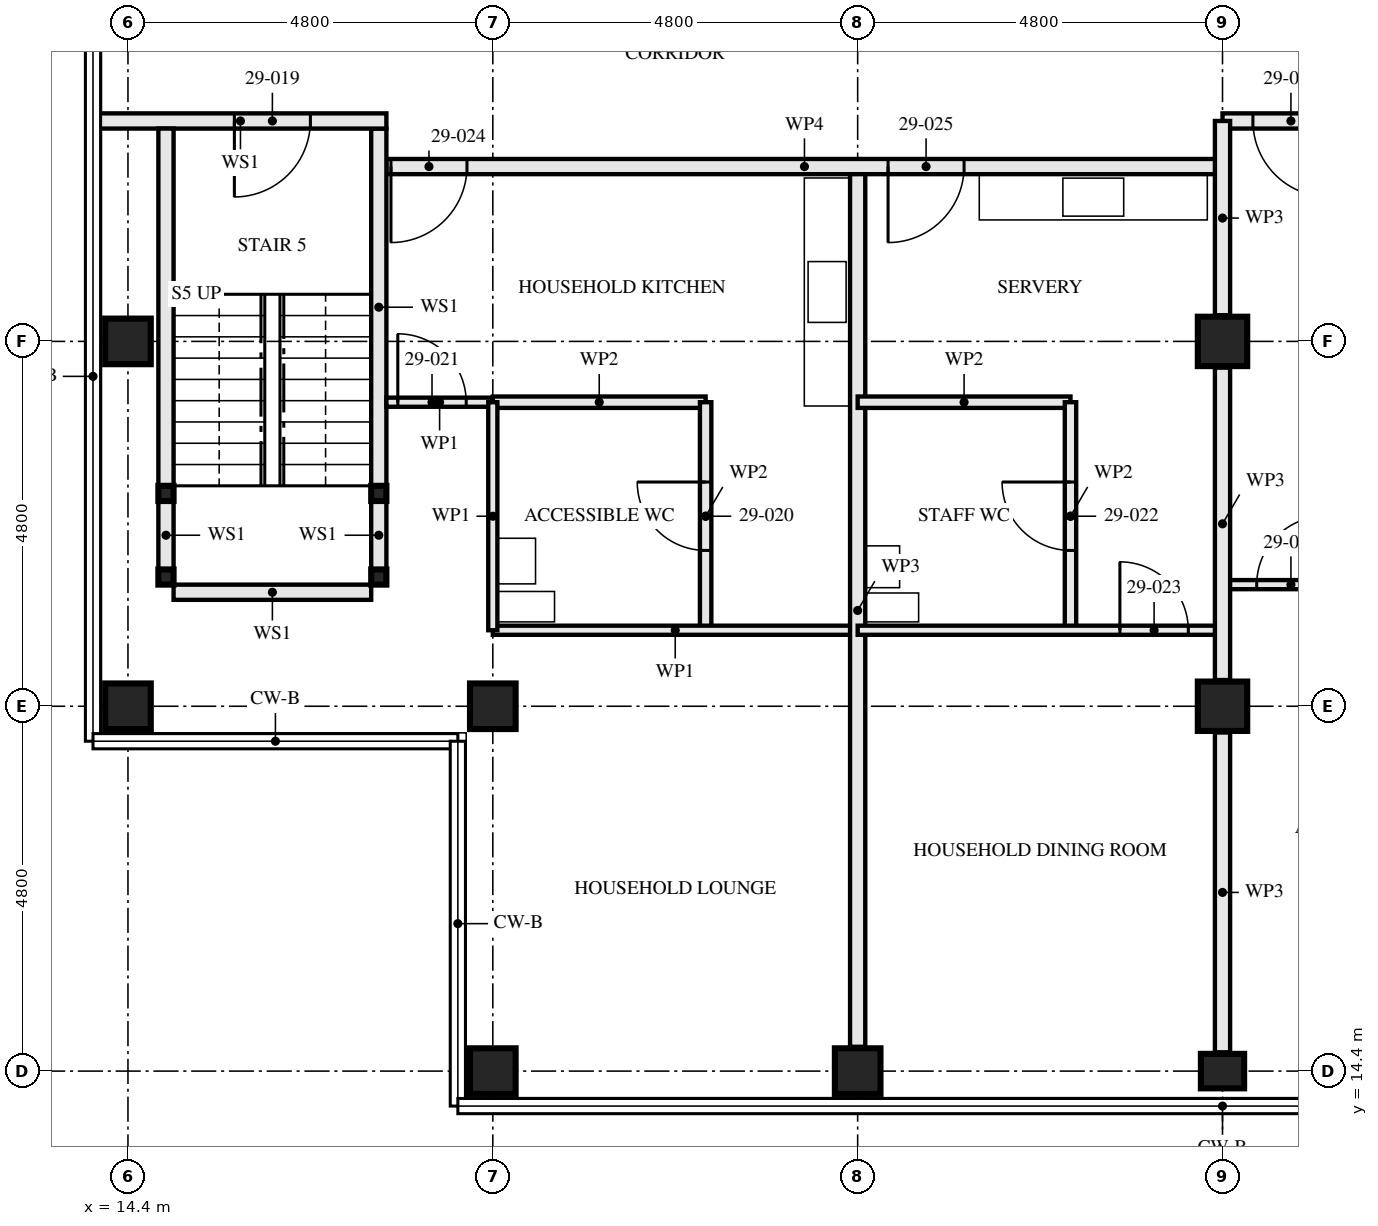
"""IFC4 building model, lengths in metres.
Left out: names, types, materials, properties, quantities, classifications, styles, units other than length and angle.
Written with IfcOpenShell. Run it as: python <this file> out.ifc"""

import sys

from ifc_helpers import new_model, si_unit, direction, frame, frame_2d, origin, origin_2d, place, context, subcontext, project, spatial, rectangle, hollow_rectangle, i_section, extrude, element, fill, save


model = new_model("IFC4")
c1 = context("Model", 3, precision=1e-05, world=origin(), true_north=direction((0.0, 1.0)))
c2 = subcontext(c1, "Body", "Model", "MODEL_VIEW")
j1 = project(units=[si_unit("LENGTHUNIT", "METRE"), si_unit("PLANEANGLEUNIT", "RADIAN")], contexts=[c1])
p1 = place(None, origin())
s1 = spatial("IfcSite", under=j1, at=p1, CompositionType="ELEMENT")
p2 = place(p1, origin())
s2 = spatial("IfcBuilding", under=s1, at=p2, CompositionType="ELEMENT")
p3 = place(p2, frame((0.0, 0.0, 108.5)))
s3 = spatial("IfcBuildingStorey", under=s2, at=p3, CompositionType="ELEMENT", Elevation=108.5)
for number, where, z_axis, x_axis in (
    (1, (14.4, 19.2, 0.0), (0.0, 0.0, 1.0), (0.0, 1.0, 0.0)),
    (2, (14.4, 24.0, 0.0), (0.0, 0.0, 1.0), (1.0, 0.0, 0.0)),
    (3, (19.2, 14.4, 0.0), (0.0, 0.0, 1.0), (0.0, 1.0, 0.0)),
    (4, (19.2, 19.2, 0.0), (0.0, 0.0, 1.0), (0.0, 1.0, 0.0)),
    (5, (24.0, 14.4, 0.0), (0.0, 0.0, 1.0), (0.0, 1.0, 0.0)),
):
    element("IfcColumn", number, at=place(p3, frame(where, z_axis=z_axis, x_axis=x_axis)), inside=s3, PredefinedType="COLUMN", context=c2, shape_type="SweptSolid", body=[
        extrude(hollow_rectangle(XDim=0.6, YDim=0.6, WallThickness=0.08, at=origin_2d()), origin(), (0.0, 0.0, 1.0), 3.5),
    ])
p4 = place(p3, frame((28.8, 14.4, 0.0), z_axis=(0.0, 0.0, 1.0), x_axis=(0.0, 1.0, 0.0)))
e6 = element("IfcColumn", 6, at=p4, inside=s3, PredefinedType="COLUMN", context=c2, shape_type="SweptSolid", body=[
    extrude(i_section(OverallWidth=0.454, OverallDepth=0.569, WebThickness=0.078, FlangeThickness=0.125, FilletRadius=0.015, at=origin_2d()), origin(), (0.0, 0.0, 1.0), 3.5),
])
for number, where, z_axis, x_axis in (
    (7, (28.8, 19.2, 0.0), (0.0, 0.0, 1.0), (1.0, 0.0, 0.0)),
    (8, (28.8, 24.0, 0.0), (0.0, 0.0, 1.0), (1.0, 0.0, 0.0)),
):
    element("IfcColumn", number, at=place(p3, frame(where, z_axis=z_axis, x_axis=x_axis)), inside=s3, PredefinedType="COLUMN", context=c2, shape_type="SweptSolid", body=[
        extrude(hollow_rectangle(XDim=0.65, YDim=0.65, WallThickness=0.05, at=origin_2d()), origin(), (0.0, 0.0, 1.0), 3.5),
    ])
for number, where, z_axis, x_axis in (
    (9, (14.9, 20.9, 0.0), (0.0, 0.0, 1.0), (1.0, 0.0, 0.0)),
    (10, (17.7, 20.9, 0.0), (0.0, 0.0, 1.0), (1.0, 0.0, 0.0)),
    (11, (14.9, 22.0, 0.0), (0.0, 0.0, 1.0), (1.0, 0.0, 0.0)),
    (12, (17.7, 22.0, 0.0), (0.0, 0.0, 1.0), (1.0, 0.0, 0.0)),
):
    element("IfcColumn", number, at=place(p3, frame(where, z_axis=z_axis, x_axis=x_axis)), inside=s3, PredefinedType="COLUMN", context=c2, shape_type="SweptSolid", body=[
        extrude(hollow_rectangle(XDim=0.2, YDim=0.2, WallThickness=0.008, at=origin_2d()), origin(), (0.0, 0.0, 1.0), 3.33),
    ])
p5 = place(p3, frame((14.9, 21.0, 0.0), z_axis=(0.0, 0.0, 1.0), x_axis=(0.0, 1.0, 0.0)))
e13 = element("IfcWall", 13, at=p5, inside=s3, PredefinedType="SOLIDWALL", context=c2, shape_type="SweptSolid", body=[
    extrude(rectangle(XDim=0.9, YDim=0.2, at=frame_2d((0.45, 0.0))), origin(), (0.0, 0.0, 1.0), 2.99),
])
p6 = place(p3, frame((14.9, 22.1, 0.0), z_axis=(0.0, 0.0, 1.0), x_axis=(0.0, 1.0, 0.0)))
e14 = element("IfcWall", 14, at=p6, inside=s3, PredefinedType="SOLIDWALL", context=c2, shape_type="SweptSolid", body=[
    extrude(rectangle(XDim=4.7, YDim=0.2, at=frame_2d((2.35, 0.0))), origin(), (0.0, 0.0, 1.0), 2.99),
])
p7 = place(p3, frame((17.7, 21.0, 0.0), z_axis=(0.0, 0.0, 1.0), x_axis=(0.0, 1.0, 0.0)))
e15 = element("IfcWall", 15, at=p7, inside=s3, PredefinedType="SOLIDWALL", context=c2, shape_type="SweptSolid", body=[
    extrude(rectangle(XDim=0.9, YDim=0.2, at=frame_2d((0.45, 0.0))), origin(), (0.0, 0.0, 1.0), 2.99),
])
p8 = place(p3, frame((17.7, 22.1, 0.0), z_axis=(0.0, 0.0, 1.0), x_axis=(0.0, 1.0, 0.0)))
e16 = element("IfcWall", 16, at=p8, inside=s3, PredefinedType="SOLIDWALL", context=c2, shape_type="SweptSolid", body=[
    extrude(rectangle(XDim=4.7, YDim=0.2, at=frame_2d((2.35, 0.0))), origin(), (0.0, 0.0, 1.0), 2.99),
])
p9 = place(p3, frame((15.0, 20.7, 0.0), z_axis=(0.0, 0.0, 1.0), x_axis=(1.0, 0.0, 0.0)))
e17 = element("IfcWall", 17, at=p9, inside=s3, PredefinedType="SOLIDWALL", context=c2, shape_type="SweptSolid", body=[
    extrude(rectangle(XDim=2.6, YDim=0.2, at=frame_2d((1.3, 0.0))), origin(), (0.0, 0.0, 1.0), 3.33),
])
p10 = place(p3, frame((13.96, 26.9, 0.0), z_axis=(0.0, 0.0, 1.0), x_axis=(1.0, 0.0, 0.0)))
e18 = element("IfcWall", 18, at=p10, inside=s3, PredefinedType="SOLIDWALL", context=c2, shape_type="SweptSolid", body=[
    extrude(rectangle(XDim=3.84, YDim=0.2, at=frame_2d((1.92, 0.0))), origin(), (0.0, 0.0, 1.0), 2.32),
])
p11 = place(p10, frame((1.84, 0.0, 0.0)))
e19 = element("IfcOpeningElement", 19, at=p11, cuts=e18, PredefinedType="OPENING", context=c2, shape_type="SweptSolid", body=[
    extrude(rectangle(XDim=1.0, YDim=2.1, at=frame_2d((0.5, 1.05))), frame((0.0, 0.111, 0.0), z_axis=(0.0, -1.0, 0.0), x_axis=(1.0, 0.0, 0.0)), (0.0, 0.0, 1.0), 0.221),
])
p12 = place(p3, frame((22.0, 20.2, 0.0), z_axis=(0.0, 0.0, 1.0), x_axis=(0.0, 1.0, 0.0)))
e20 = element("IfcWall", 20, at=p12, inside=s3, PredefinedType="PARTITIONING", context=c2, shape_type="SweptSolid", body=[
    extrude(rectangle(XDim=3.0, YDim=0.15, at=frame_2d((1.5, 0.0))), origin(), (0.0, 0.0, 1.0), 3.33),
])
p13 = place(p12, frame((1.05, 0.0, 0.0)))
e21 = element("IfcOpeningElement", 21, at=p13, cuts=e20, PredefinedType="OPENING", context=c2, shape_type="SweptSolid", body=[
    extrude(rectangle(XDim=0.9, YDim=2.1, at=frame_2d((0.45, 1.05))), frame((0.0, 0.085, 0.0), z_axis=(0.0, -1.0, 0.0), x_axis=(1.0, 0.0, 0.0)), (0.0, 0.0, 1.0), 0.171),
])
p14 = place(p3, frame((19.2, 23.2, 0.0), z_axis=(0.0, 0.0, 1.0), x_axis=(1.0, 0.0, 0.0)))
e22 = element("IfcWall", 22, at=p14, inside=s3, PredefinedType="PARTITIONING", context=c2, shape_type="SweptSolid", body=[
    extrude(rectangle(XDim=2.8, YDim=0.15, at=frame_2d((1.4, 0.0))), origin(), (0.0, 0.0, 1.0), 3.33),
])
p15 = place(p3, frame((17.8, 23.2, 0.0), z_axis=(0.0, 0.0, 1.0), x_axis=(1.0, 0.0, 0.0)))
e23 = element("IfcWall", 23, at=p15, inside=s3, PredefinedType="PARTITIONING", context=c2, shape_type="SweptSolid", body=[
    extrude(rectangle(XDim=1.4, YDim=0.12, at=frame_2d((0.7, 0.0))), origin(), (0.0, 0.0, 1.0), 3.33),
])
p16 = place(p15, frame((0.15, 0.0, 0.0)))
e24 = element("IfcOpeningElement", 24, at=p16, cuts=e23, PredefinedType="OPENING", context=c2, shape_type="SweptSolid", body=[
    extrude(rectangle(XDim=0.9, YDim=2.1, at=frame_2d((0.45, 1.05))), frame((0.0, 0.071, 0.0), z_axis=(0.0, -1.0, 0.0), x_axis=(1.0, 0.0, 0.0)), (0.0, 0.0, 1.0), 0.141),
])
p17 = place(p3, frame((19.2, 20.2, 0.0), z_axis=(0.0, 0.0, 1.0), x_axis=(1.0, 0.0, 0.0)))
e25 = element("IfcWall", 25, at=p17, inside=s3, PredefinedType="PARTITIONING", context=c2, shape_type="SweptSolid", body=[
    extrude(rectangle(XDim=4.8, YDim=0.12, at=frame_2d((2.4, 0.0))), origin(), (0.0, 0.0, 1.0), 3.33),
])
p18 = place(p3, frame((19.2, 20.2, 0.0), z_axis=(0.0, 0.0, 1.0), x_axis=(0.0, 1.0, 0.0)))
e26 = element("IfcWall", 26, at=p18, inside=s3, PredefinedType="PARTITIONING", context=c2, shape_type="SweptSolid", body=[
    extrude(rectangle(XDim=3.0, YDim=0.12, at=frame_2d((1.5, 0.0))), origin(), (0.0, 0.0, 1.0), 2.55),
])
p19 = place(p3, frame((24.0, 14.72, 0.0), z_axis=(0.0, 0.0, 1.0), x_axis=(0.0, 1.0, 0.0)))
e27 = element("IfcWall", 27, at=p19, inside=s3, PredefinedType="PARTITIONING", context=c2, shape_type="SweptSolid", body=[
    extrude(rectangle(XDim=11.48, YDim=0.2, at=frame_2d((5.74, 0.0))), origin(), (0.0, 0.0, 1.0), 2.55),
])
p20 = place(p3, frame((26.8, 20.2, 0.0), z_axis=(0.0, 0.0, 1.0), x_axis=(0.0, 1.0, 0.0)))
e28 = element("IfcWall", 28, at=p20, inside=s3, PredefinedType="PARTITIONING", context=c2, shape_type="SweptSolid", body=[
    extrude(rectangle(XDim=3.0, YDim=0.15, at=frame_2d((1.5, 0.0))), origin(), (0.0, 0.0, 1.0), 3.33),
])
p21 = place(p20, frame((1.05, 0.0, 0.0)))
e29 = element("IfcOpeningElement", 29, at=p21, cuts=e28, PredefinedType="OPENING", context=c2, shape_type="SweptSolid", body=[
    extrude(rectangle(XDim=0.9, YDim=2.1, at=frame_2d((0.45, 1.05))), frame((0.0, 0.085, 0.0), z_axis=(0.0, -1.0, 0.0), x_axis=(1.0, 0.0, 0.0)), (0.0, 0.0, 1.0), 0.171),
])
p22 = place(p3, frame((24.0, 23.2, 0.0), z_axis=(0.0, 0.0, 1.0), x_axis=(1.0, 0.0, 0.0)))
e30 = element("IfcWall", 30, at=p22, inside=s3, PredefinedType="PARTITIONING", context=c2, shape_type="SweptSolid", body=[
    extrude(rectangle(XDim=2.8, YDim=0.15, at=frame_2d((1.4, 0.0))), origin(), (0.0, 0.0, 1.0), 3.33),
])
p23 = place(p3, frame((24.0, 20.2, 0.0), z_axis=(0.0, 0.0, 1.0), x_axis=(1.0, 0.0, 0.0)))
e31 = element("IfcWall", 31, at=p23, inside=s3, PredefinedType="PARTITIONING", context=c2, shape_type="SweptSolid", body=[
    extrude(rectangle(XDim=4.8, YDim=0.12, at=frame_2d((2.4, 0.0))), origin(), (0.0, 0.0, 1.0), 3.33),
])
p24 = place(p23, frame((3.45, 0.0, 0.0)))
e32 = element("IfcOpeningElement", 32, at=p24, cuts=e31, PredefinedType="OPENING", context=c2, shape_type="SweptSolid", body=[
    extrude(rectangle(XDim=0.9, YDim=2.1, at=frame_2d((0.45, 1.05))), frame((0.0, 0.071, 0.0), z_axis=(0.0, -1.0, 0.0), x_axis=(1.0, 0.0, 0.0)), (0.0, 0.0, 1.0), 0.141),
])
p25 = place(p3, frame((17.8, 26.3, 0.0), z_axis=(0.0, 0.0, 1.0), x_axis=(1.0, 0.0, 0.0)))
e33 = element("IfcWall", 33, at=p25, inside=s3, PredefinedType="PARTITIONING", context=c2, shape_type="SweptSolid", body=[
    extrude(rectangle(XDim=11.0, YDim=0.2, at=frame_2d((5.5, 0.0))), origin(), (0.0, 0.0, 1.0), 2.55),
])
p26 = place(p25, frame((0.06, 0.0, 0.0)))
e34 = element("IfcOpeningElement", 34, at=p26, cuts=e33, PredefinedType="OPENING", context=c2, shape_type="SweptSolid", body=[
    extrude(rectangle(XDim=1.0, YDim=2.1, at=frame_2d((0.5, 1.05))), frame((0.0, 0.111, 0.0), z_axis=(0.0, -1.0, 0.0), x_axis=(1.0, 0.0, 0.0)), (0.0, 0.0, 1.0), 0.221),
])
p27 = place(p25, frame((6.6, 0.0, 0.0)))
e35 = element("IfcOpeningElement", 35, at=p27, cuts=e33, PredefinedType="OPENING", context=c2, shape_type="SweptSolid", body=[
    extrude(rectangle(XDim=1.0, YDim=2.1, at=frame_2d((0.5, 1.05))), frame((0.0, 0.111, 0.0), z_axis=(0.0, -1.0, 0.0), x_axis=(1.0, 0.0, 0.0)), (0.0, 0.0, 1.0), 0.221),
])
p28 = place(p3, frame((28.8, 20.8, 0.0), z_axis=(0.0, 0.0, 1.0), x_axis=(1.0, 0.0, 0.0)))
e36 = element("IfcWall", 36, at=p28, inside=s3, PredefinedType="PARTITIONING", context=c2, shape_type="SweptSolid", body=[
    extrude(rectangle(XDim=4.8, YDim=0.12, at=frame_2d((2.4, 0.0))), origin(), (0.0, 0.0, 1.0), 3.33),
])
p29 = place(p28, frame((0.45, 0.0, 0.0)))
e37 = element("IfcOpeningElement", 37, at=p29, cuts=e36, PredefinedType="OPENING", context=c2, shape_type="SweptSolid", body=[
    extrude(rectangle(XDim=0.9, YDim=2.1, at=frame_2d((0.45, 1.05))), frame((0.0, 0.071, 0.0), z_axis=(0.0, -1.0, 0.0), x_axis=(1.0, 0.0, 0.0)), (0.0, 0.0, 1.0), 0.141),
])
p30 = place(p28, frame((2.925, 0.0, 0.0)))
e38 = element("IfcOpeningElement", 38, at=p30, cuts=e36, PredefinedType="OPENING", context=c2, shape_type="SweptSolid", body=[
    extrude(rectangle(XDim=0.95, YDim=2.1, at=frame_2d((0.475, 1.05))), frame((0.0, 0.071, 0.0), z_axis=(0.0, -1.0, 0.0), x_axis=(1.0, 0.0, 0.0)), (0.0, 0.0, 1.0), 0.141),
])
p31 = place(p3, frame((28.8, 26.9, 0.0), z_axis=(0.0, 0.0, 1.0), x_axis=(1.0, 0.0, 0.0)))
e39 = element("IfcWall", 39, at=p31, inside=s3, PredefinedType="PARTITIONING", context=c2, shape_type="SweptSolid", body=[
    extrude(rectangle(XDim=9.6, YDim=0.2, at=frame_2d((4.8, 0.0))), origin(), (0.0, 0.0, 1.0), 3.33),
])
p32 = place(p31, frame((0.4, 0.0, 0.0)))
e40 = element("IfcOpeningElement", 40, at=p32, cuts=e39, PredefinedType="OPENING", context=c2, shape_type="SweptSolid", body=[
    extrude(rectangle(XDim=1.0, YDim=2.1, at=frame_2d((0.5, 1.05))), frame((0.0, 0.111, 0.0), z_axis=(0.0, -1.0, 0.0), x_axis=(1.0, 0.0, 0.0)), (0.0, 0.0, 1.0), 0.221),
])
p33 = place(p31, frame((5.2, 0.0, 0.0)))
e41 = element("IfcOpeningElement", 41, at=p33, cuts=e39, PredefinedType="OPENING", context=c2, shape_type="SweptSolid", body=[
    extrude(rectangle(XDim=1.0, YDim=2.1, at=frame_2d((0.5, 1.05))), frame((0.0, 0.111, 0.0), z_axis=(0.0, -1.0, 0.0), x_axis=(1.0, 0.0, 0.0)), (0.0, 0.0, 1.0), 0.221),
])
p34 = place(p3, frame((28.8, 14.647, 0.0), z_axis=(0.0, 0.0, 1.0), x_axis=(0.0, 1.0, 0.0)))
e42 = element("IfcWall", 42, at=p34, inside=s3, PredefinedType="PARTITIONING", context=c2, shape_type="SweptSolid", body=[
    extrude(rectangle(XDim=4.208, YDim=0.2, at=frame_2d((2.104, 0.0))), origin(), (0.0, 0.0, 1.0), 2.32),
])
p35 = place(p3, frame((28.8, 19.545, 0.0), z_axis=(0.0, 0.0, 1.0), x_axis=(0.0, 1.0, 0.0)))
e43 = element("IfcWall", 43, at=p35, inside=s3, PredefinedType="PARTITIONING", context=c2, shape_type="SweptSolid", body=[
    extrude(rectangle(XDim=4.11, YDim=0.2, at=frame_2d((2.055, 0.0))), origin(), (0.0, 0.0, 1.0), 2.32),
])
p36 = place(p3, frame((28.8, 24.345, 0.0), z_axis=(0.0, 0.0, 1.0), x_axis=(0.0, 1.0, 0.0)))
e44 = element("IfcWall", 44, at=p36, inside=s3, PredefinedType="PARTITIONING", context=c2, shape_type="SweptSolid", body=[
    extrude(rectangle(XDim=2.555, YDim=0.2, at=frame_2d((1.277, 0.0))), origin(), (0.0, 0.0, 1.0), 2.32),
])
p37 = place(p11, frame((1.0, 0.0, 0.0), z_axis=(0.0, 0.0, 1.0), x_axis=(-1.0, 0.0, 0.0)))
e45 = element("IfcDoor", 45, at=p37, inside=s3, OperationType="SINGLE_SWING_LEFT", PredefinedType="DOOR", context=c2, shape_type="SweptSolid", body=[
    extrude(rectangle(XDim=1.0, YDim=2.1, at=frame_2d((0.5, 1.05))), frame((0.0, 0.032, 0.0), z_axis=(0.0, -1.0, 0.0), x_axis=(1.0, 0.0, 0.0)), (0.0, 0.0, 1.0), 0.064),
])
fill(e19, e45)
p38 = place(p13, origin())
e46 = element("IfcDoor", 46, at=p38, inside=s3, OperationType="SINGLE_SWING_LEFT", PredefinedType="DOOR", context=c2, shape_type="SweptSolid", body=[
    extrude(rectangle(XDim=0.9, YDim=2.1, at=frame_2d((0.45, 1.05))), frame((0.0, 0.022, 0.0), z_axis=(0.0, -1.0, 0.0), x_axis=(1.0, 0.0, 0.0)), (0.0, 0.0, 1.0), 0.044),
])
fill(e21, e46)
p39 = place(p16, origin())
e47 = element("IfcDoor", 47, at=p39, inside=s3, OperationType="SINGLE_SWING_RIGHT", PredefinedType="DOOR", context=c2, shape_type="SweptSolid", body=[
    extrude(rectangle(XDim=0.9, YDim=2.1, at=frame_2d((0.45, 1.05))), frame((0.0, 0.022, 0.0), z_axis=(0.0, -1.0, 0.0), x_axis=(1.0, 0.0, 0.0)), (0.0, 0.0, 1.0), 0.044),
])
fill(e24, e47)
p40 = place(p21, origin())
e48 = element("IfcDoor", 48, at=p40, inside=s3, OperationType="SINGLE_SWING_LEFT", PredefinedType="DOOR", context=c2, shape_type="SweptSolid", body=[
    extrude(rectangle(XDim=0.9, YDim=2.1, at=frame_2d((0.45, 1.05))), frame((0.0, 0.022, 0.0), z_axis=(0.0, -1.0, 0.0), x_axis=(1.0, 0.0, 0.0)), (0.0, 0.0, 1.0), 0.044),
])
fill(e29, e48)
p41 = place(p24, origin())
e49 = element("IfcDoor", 49, at=p41, inside=s3, OperationType="SINGLE_SWING_RIGHT", PredefinedType="DOOR", context=c2, shape_type="SweptSolid", body=[
    extrude(rectangle(XDim=0.9, YDim=2.1, at=frame_2d((0.45, 1.05))), frame((0.0, 0.022, 0.0), z_axis=(0.0, -1.0, 0.0), x_axis=(1.0, 0.0, 0.0)), (0.0, 0.0, 1.0), 0.044),
])
fill(e32, e49)
p42 = place(p26, frame((1.0, 0.0, 0.0), z_axis=(0.0, 0.0, 1.0), x_axis=(-1.0, 0.0, 0.0)))
e50 = element("IfcDoor", 50, at=p42, inside=s3, OperationType="SINGLE_SWING_LEFT", PredefinedType="DOOR", context=c2, shape_type="SweptSolid", body=[
    extrude(rectangle(XDim=1.0, YDim=2.1, at=frame_2d((0.5, 1.05))), frame((0.0, 0.027, 0.0), z_axis=(0.0, -1.0, 0.0), x_axis=(1.0, 0.0, 0.0)), (0.0, 0.0, 1.0), 0.054),
])
fill(e34, e50)
p43 = place(p27, frame((1.0, 0.0, 0.0), z_axis=(0.0, 0.0, 1.0), x_axis=(-1.0, 0.0, 0.0)))
e51 = element("IfcDoor", 51, at=p43, inside=s3, OperationType="SINGLE_SWING_LEFT", PredefinedType="DOOR", context=c2, shape_type="SweptSolid", body=[
    extrude(rectangle(XDim=1.0, YDim=2.1, at=frame_2d((0.5, 1.05))), frame((0.0, 0.027, 0.0), z_axis=(0.0, -1.0, 0.0), x_axis=(1.0, 0.0, 0.0)), (0.0, 0.0, 1.0), 0.054),
])
fill(e35, e51)
p44 = place(p29, origin())
e52 = element("IfcDoor", 52, at=p44, inside=s3, OperationType="SINGLE_SWING_LEFT", PredefinedType="DOOR", context=c2, shape_type="SweptSolid", body=[
    extrude(rectangle(XDim=0.9, YDim=2.1, at=frame_2d((0.45, 1.05))), frame((0.0, 0.022, 0.0), z_axis=(0.0, -1.0, 0.0), x_axis=(1.0, 0.0, 0.0)), (0.0, 0.0, 1.0), 0.044),
])
fill(e37, e52)
p45 = place(p32, frame((1.0, 0.0, 0.0), z_axis=(0.0, 0.0, 1.0), x_axis=(-1.0, 0.0, 0.0)))
e53 = element("IfcDoor", 53, at=p45, inside=s3, OperationType="SINGLE_SWING_RIGHT", PredefinedType="DOOR", context=c2, shape_type="SweptSolid", body=[
    extrude(rectangle(XDim=1.0, YDim=2.1, at=frame_2d((0.5, 1.05))), frame((0.0, 0.027, 0.0), z_axis=(0.0, -1.0, 0.0), x_axis=(1.0, 0.0, 0.0)), (0.0, 0.0, 1.0), 0.054),
])
fill(e40, e53)
save(model, sys.argv[1])
